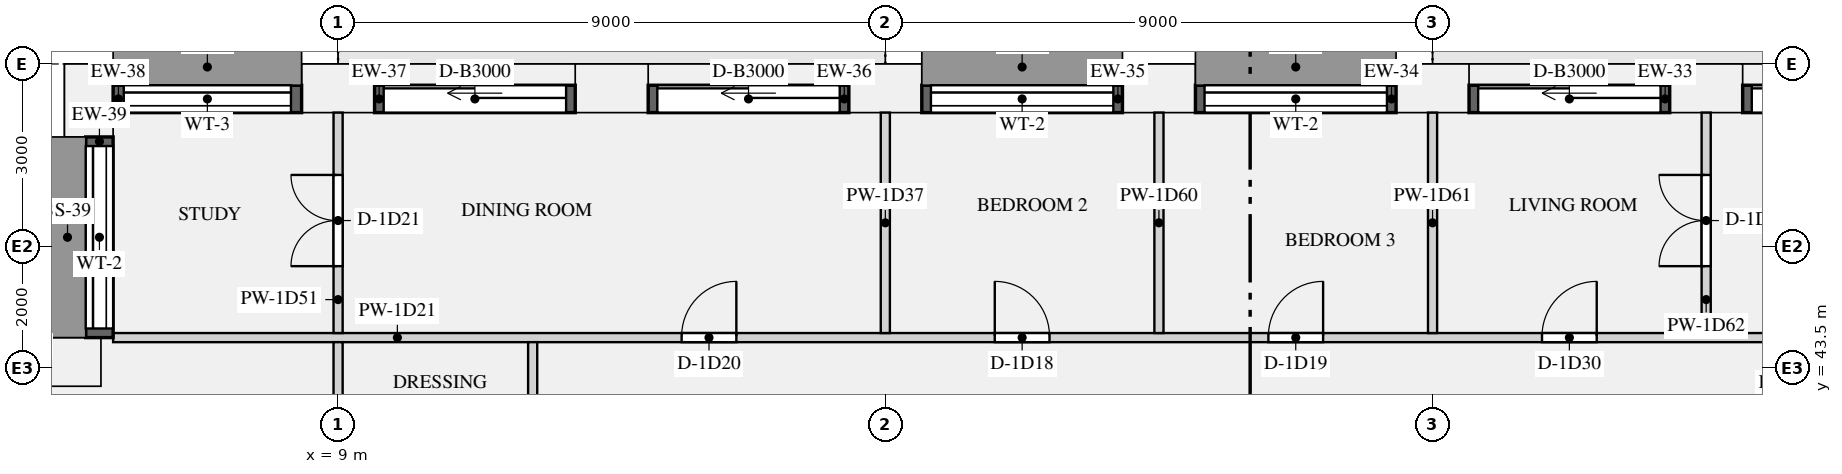
"""IFC4 building model, lengths in metres.
Left out: names, types, materials, properties, quantities, classifications, styles, units other than length and angle.
Written with IfcOpenShell. Run it as: python <this file> out.ifc"""

import sys

from ifc_helpers import new_model, si_unit, direction, frame, frame_2d, origin, origin_2d, place, context, subcontext, project, spatial, rectangle, extrude, element, fill, save


model = new_model("IFC4")
c1 = context("Model", 3, precision=1e-05, world=origin(), true_north=direction((0.0, 1.0)))
c2 = subcontext(c1, "Body", "Model", "MODEL_VIEW")
j1 = project(units=[si_unit("LENGTHUNIT", "METRE"), si_unit("PLANEANGLEUNIT", "RADIAN")], contexts=[c1])
p1 = place(None, origin())
s1 = spatial("IfcSite", under=j1, at=p1, CompositionType="ELEMENT")
p2 = place(p1, origin())
s2 = spatial("IfcBuilding", under=s1, at=p2, CompositionType="ELEMENT")
p3 = place(p2, frame((0.0, 0.0, 47.85)))
s3 = spatial("IfcBuildingStorey", under=s2, at=p3, CompositionType="ELEMENT", Elevation=47.85)
for number, where, z_axis, x_axis in (
    (1, (31.5, 48.1, 0.0), (0.0, 0.0, 1.0), (-1.0, 0.0, 0.0)),
    (2, (27.0, 48.1, 0.0), (0.0, 0.0, 1.0), (-1.0, 0.0, 0.0)),
    (3, (22.5, 48.1, 0.0), (0.0, 0.0, 1.0), (-1.0, 0.0, 0.0)),
    (4, (18.0, 48.1, 0.0), (0.0, 0.0, 1.0), (-1.0, 0.0, 0.0)),
    (5, (13.5, 48.1, 0.0), (0.0, 0.0, 1.0), (-1.0, 0.0, 0.0)),
    (6, (9.0, 48.1, 0.0), (0.0, 0.0, 1.0), (-1.0, 0.0, 0.0)),
    (7, (4.9, 47.9, 0.0), (0.0, 0.0, 1.0), (0.0, -1.0, 0.0)),
    (8, (4.5, 43.6, 0.0), (0.0, 0.0, 1.0), (-1.0, 0.0, 0.0)),
):
    element("IfcColumn", number, at=place(p3, frame(where, z_axis=z_axis, x_axis=x_axis)), inside=s3, PredefinedType="USERDEFINED", context=c2, shape_type="SweptSolid", body=[
        extrude(rectangle(XDim=1.2, YDim=0.8, at=origin_2d()), origin(), (0.0, 0.0, 1.0), 3.15),
    ])
p4 = place(p3, frame((35.4, 47.925, 0.0), z_axis=(0.0, 0.0, 1.0), x_axis=(-1.0, 0.0, 0.0)))
e9 = element("IfcWall", 9, at=p4, inside=s3, PredefinedType="SOLIDWALL", context=c2, shape_type="SweptSolid", body=[
    extrude(rectangle(XDim=3.3, YDim=0.45, at=frame_2d((1.65, 0.0))), origin(), (0.0, 0.0, 1.0), 2.83),
])
p5 = place(p4, frame((0.15, 0.0, 0.0)))
e10 = element("IfcOpeningElement", 10, at=p5, cuts=e9, PredefinedType="OPENING", context=c2, shape_type="SweptSolid", body=[
    extrude(rectangle(XDim=3.0, YDim=2.3, at=frame_2d((1.5, 1.15))), frame((0.0, 0.235, 0.0), z_axis=(0.0, -1.0, 0.0), x_axis=(1.0, 0.0, 0.0)), (0.0, 0.0, 1.0), 0.47),
])
p6 = place(p3, frame((30.9, 47.925, 0.0), z_axis=(0.0, 0.0, 1.0), x_axis=(-1.0, 0.0, 0.0)))
e11 = element("IfcWall", 11, at=p6, inside=s3, PredefinedType="SOLIDWALL", context=c2, shape_type="SweptSolid", body=[
    extrude(rectangle(XDim=3.3, YDim=0.45, at=frame_2d((1.65, 0.0))), origin(), (0.0, 0.0, 1.0), 2.83),
])
p7 = place(p6, frame((0.15, 0.0, 0.0)))
e12 = element("IfcOpeningElement", 12, at=p7, cuts=e11, PredefinedType="OPENING", context=c2, shape_type="SweptSolid", body=[
    extrude(rectangle(XDim=3.0, YDim=2.3, at=frame_2d((1.5, 1.15))), frame((0.0, 0.235, 0.0), z_axis=(0.0, -1.0, 0.0), x_axis=(1.0, 0.0, 0.0)), (0.0, 0.0, 1.0), 0.47),
])
p8 = place(p3, frame((26.4, 47.925, 0.9), z_axis=(0.0, 0.0, 1.0), x_axis=(-1.0, 0.0, 0.0)))
e13 = element("IfcWall", 13, at=p8, inside=s3, PredefinedType="SOLIDWALL", context=c2, shape_type="SweptSolid", body=[
    extrude(rectangle(XDim=3.3, YDim=0.45, at=frame_2d((1.65, 0.0))), origin(), (0.0, 0.0, 1.0), 1.93),
])
p9 = place(p8, frame((0.15, 0.0, 0.15)))
e14 = element("IfcOpeningElement", 14, at=p9, cuts=e13, PredefinedType="OPENING", context=c2, shape_type="SweptSolid", body=[
    extrude(rectangle(XDim=3.0, YDim=1.5, at=frame_2d((1.5, 0.75))), frame((0.0, 0.235, 0.0), z_axis=(0.0, -1.0, 0.0), x_axis=(1.0, 0.0, 0.0)), (0.0, 0.0, 1.0), 0.47),
])
p10 = place(p3, frame((21.9, 47.925, 0.9), z_axis=(0.0, 0.0, 1.0), x_axis=(-1.0, 0.0, 0.0)))
e15 = element("IfcWall", 15, at=p10, inside=s3, PredefinedType="SOLIDWALL", context=c2, shape_type="SweptSolid", body=[
    extrude(rectangle(XDim=3.3, YDim=0.45, at=frame_2d((1.65, 0.0))), origin(), (0.0, 0.0, 1.0), 1.93),
])
p11 = place(p10, frame((0.15, 0.0, 0.15)))
e16 = element("IfcOpeningElement", 16, at=p11, cuts=e15, PredefinedType="OPENING", context=c2, shape_type="SweptSolid", body=[
    extrude(rectangle(XDim=3.0, YDim=1.5, at=frame_2d((1.5, 0.75))), frame((0.0, 0.235, 0.0), z_axis=(0.0, -1.0, 0.0), x_axis=(1.0, 0.0, 0.0)), (0.0, 0.0, 1.0), 0.47),
])
p12 = place(p3, frame((17.4, 47.925, 0.0), z_axis=(0.0, 0.0, 1.0), x_axis=(-1.0, 0.0, 0.0)))
e17 = element("IfcWall", 17, at=p12, inside=s3, PredefinedType="SOLIDWALL", context=c2, shape_type="SweptSolid", body=[
    extrude(rectangle(XDim=3.3, YDim=0.45, at=frame_2d((1.65, 0.0))), origin(), (0.0, 0.0, 1.0), 2.83),
])
p13 = place(p12, frame((0.15, 0.0, 0.0)))
e18 = element("IfcOpeningElement", 18, at=p13, cuts=e17, PredefinedType="OPENING", context=c2, shape_type="SweptSolid", body=[
    extrude(rectangle(XDim=3.0, YDim=2.3, at=frame_2d((1.5, 1.15))), frame((0.0, 0.235, 0.0), z_axis=(0.0, -1.0, 0.0), x_axis=(1.0, 0.0, 0.0)), (0.0, 0.0, 1.0), 0.47),
])
p14 = place(p3, frame((12.9, 47.925, 0.0), z_axis=(0.0, 0.0, 1.0), x_axis=(-1.0, 0.0, 0.0)))
e19 = element("IfcWall", 19, at=p14, inside=s3, PredefinedType="SOLIDWALL", context=c2, shape_type="SweptSolid", body=[
    extrude(rectangle(XDim=3.3, YDim=0.45, at=frame_2d((1.65, 0.0))), origin(), (0.0, 0.0, 1.0), 2.83),
])
p15 = place(p14, frame((0.15, 0.0, 0.0)))
e20 = element("IfcOpeningElement", 20, at=p15, cuts=e19, PredefinedType="OPENING", context=c2, shape_type="SweptSolid", body=[
    extrude(rectangle(XDim=3.0, YDim=2.3, at=frame_2d((1.5, 1.15))), frame((0.0, 0.235, 0.0), z_axis=(0.0, -1.0, 0.0), x_axis=(1.0, 0.0, 0.0)), (0.0, 0.0, 1.0), 0.47),
])
p16 = place(p3, frame((8.4, 47.925, 0.9), z_axis=(0.0, 0.0, 1.0), x_axis=(-1.0, 0.0, 0.0)))
e21 = element("IfcWall", 21, at=p16, inside=s3, PredefinedType="SOLIDWALL", context=c2, shape_type="SweptSolid", body=[
    extrude(rectangle(XDim=3.1, YDim=0.45, at=frame_2d((1.55, 0.0))), origin(), (0.0, 0.0, 1.0), 1.93),
])
p17 = place(p16, frame((0.175, 0.0, 0.15)))
e22 = element("IfcOpeningElement", 22, at=p17, cuts=e21, PredefinedType="OPENING", context=c2, shape_type="SweptSolid", body=[
    extrude(rectangle(XDim=2.75, YDim=1.5, at=frame_2d((1.375, 0.75))), frame((0.0, 0.235, 0.0), z_axis=(0.0, -1.0, 0.0), x_axis=(1.0, 0.0, 0.0)), (0.0, 0.0, 1.0), 0.47),
])
p18 = place(p3, frame((5.075, 47.3, 0.9), z_axis=(0.0, 0.0, 1.0), x_axis=(0.0, -1.0, 0.0)))
e23 = element("IfcWall", 23, at=p18, inside=s3, PredefinedType="SOLIDWALL", context=c2, shape_type="SweptSolid", body=[
    extrude(rectangle(XDim=3.3, YDim=0.45, at=frame_2d((1.65, 0.0))), origin(), (0.0, 0.0, 1.0), 1.93),
])
p19 = place(p18, frame((0.15, 0.0, 0.15)))
e24 = element("IfcOpeningElement", 24, at=p19, cuts=e23, PredefinedType="OPENING", context=c2, shape_type="SweptSolid", body=[
    extrude(rectangle(XDim=3.0, YDim=1.5, at=frame_2d((1.5, 0.75))), frame((0.0, 0.235, 0.0), z_axis=(0.0, -1.0, 0.0), x_axis=(1.0, 0.0, 0.0)), (0.0, 0.0, 1.0), 0.47),
])
p20 = place(p3, frame((5.3, 44.0, 0.0), z_axis=(0.0, 0.0, 1.0), x_axis=(1.0, 0.0, 0.0)))
e25 = element("IfcWall", 25, at=p20, inside=s3, PredefinedType="PARTITIONING", context=c2, shape_type="SweptSolid", body=[
    extrude(rectangle(XDim=27.775, YDim=0.15, at=frame_2d((13.887, 0.0))), origin(), (0.0, 0.0, 1.0), 2.83),
])
p21 = place(p20, frame((14.5, 0.0, 0.0)))
e26 = element("IfcOpeningElement", 26, at=p21, cuts=e25, PredefinedType="OPENING", context=c2, shape_type="SweptSolid", body=[
    extrude(rectangle(XDim=0.9, YDim=2.1, at=frame_2d((0.45, 1.05))), frame((0.0, 0.085, 0.0), z_axis=(0.0, -1.0, 0.0), x_axis=(1.0, 0.0, 0.0)), (0.0, 0.0, 1.0), 0.17),
])
p22 = place(p20, frame((19.0, 0.0, 0.0)))
e27 = element("IfcOpeningElement", 27, at=p22, cuts=e25, PredefinedType="OPENING", context=c2, shape_type="SweptSolid", body=[
    extrude(rectangle(XDim=0.9, YDim=2.1, at=frame_2d((0.45, 1.05))), frame((0.0, 0.085, 0.0), z_axis=(0.0, -1.0, 0.0), x_axis=(1.0, 0.0, 0.0)), (0.0, 0.0, 1.0), 0.17),
])
p23 = place(p20, frame((9.35, 0.0, 0.0)))
e28 = element("IfcOpeningElement", 28, at=p23, cuts=e25, PredefinedType="OPENING", context=c2, shape_type="SweptSolid", body=[
    extrude(rectangle(XDim=0.9, YDim=2.1, at=frame_2d((0.45, 1.05))), frame((0.0, 0.085, 0.0), z_axis=(0.0, -1.0, 0.0), x_axis=(1.0, 0.0, 0.0)), (0.0, 0.0, 1.0), 0.17),
])
p24 = place(p20, frame((23.5, 0.0, 0.0)))
e29 = element("IfcOpeningElement", 29, at=p24, cuts=e25, PredefinedType="OPENING", context=c2, shape_type="SweptSolid", body=[
    extrude(rectangle(XDim=0.9, YDim=2.1, at=frame_2d((0.45, 1.05))), frame((0.0, 0.085, 0.0), z_axis=(0.0, -1.0, 0.0), x_axis=(1.0, 0.0, 0.0)), (0.0, 0.0, 1.0), 0.17),
])
p25 = place(p3, frame((18.0, 44.075, 0.0), z_axis=(0.0, 0.0, 1.0), x_axis=(0.0, 1.0, 0.0)))
e30 = element("IfcWall", 30, at=p25, inside=s3, PredefinedType="PARTITIONING", context=c2, shape_type="SweptSolid", body=[
    extrude(rectangle(XDim=3.625, YDim=0.15, at=frame_2d((1.812, 0.0))), origin(), (0.0, 0.0, 1.0), 2.83),
])
p26 = place(p3, frame((9.0, 36.35, 0.0), z_axis=(0.0, 0.0, 1.0), x_axis=(0.0, 1.0, 0.0)))
e31 = element("IfcWall", 31, at=p26, inside=s3, PredefinedType="PARTITIONING", context=c2, shape_type="SweptSolid", body=[
    extrude(rectangle(XDim=7.575, YDim=0.15, at=frame_2d((3.788, 0.0))), origin(), (0.0, 0.0, 1.0), 2.83),
])
p27 = place(p26, frame((5.312, 0.0, 0.0)))
e32 = element("IfcOpeningElement", 32, at=p27, cuts=e31, PredefinedType="OPENING", context=c2, shape_type="SweptSolid", body=[
    extrude(rectangle(XDim=0.8, YDim=2.1, at=frame_2d((0.4, 1.05))), frame((0.0, 0.085, 0.0), z_axis=(0.0, -1.0, 0.0), x_axis=(1.0, 0.0, 0.0)), (0.0, 0.0, 1.0), 0.17),
])
p28 = place(p26, frame((1.438, 0.0, 0.0)))
e33 = element("IfcOpeningElement", 33, at=p28, cuts=e31, PredefinedType="OPENING", context=c2, shape_type="SweptSolid", body=[
    extrude(rectangle(XDim=0.8, YDim=2.1, at=frame_2d((0.4, 1.05))), frame((0.0, 0.085, 0.0), z_axis=(0.0, -1.0, 0.0), x_axis=(1.0, 0.0, 0.0)), (0.0, 0.0, 1.0), 0.17),
])
p29 = place(p3, frame((9.0, 44.075, 0.0), z_axis=(0.0, 0.0, 1.0), x_axis=(0.0, 1.0, 0.0)))
e34 = element("IfcWall", 34, at=p29, inside=s3, PredefinedType="PARTITIONING", context=c2, shape_type="SweptSolid", body=[
    extrude(rectangle(XDim=3.625, YDim=0.15, at=frame_2d((1.812, 0.0))), origin(), (0.0, 0.0, 1.0), 2.83),
])
p30 = place(p29, frame((1.1, 0.0, 0.0)))
e35 = element("IfcOpeningElement", 35, at=p30, cuts=e34, PredefinedType="OPENING", context=c2, shape_type="SweptSolid", body=[
    extrude(rectangle(XDim=1.5, YDim=2.1, at=frame_2d((0.75, 1.05))), frame((0.0, 0.085, 0.0), z_axis=(0.0, -1.0, 0.0), x_axis=(1.0, 0.0, 0.0)), (0.0, 0.0, 1.0), 0.17),
])
p31 = place(p3, frame((12.2, 36.35, 0.0), z_axis=(0.0, 0.0, 1.0), x_axis=(0.0, 1.0, 0.0)))
e36 = element("IfcWall", 36, at=p31, inside=s3, PredefinedType="PARTITIONING", context=c2, shape_type="SweptSolid", body=[
    extrude(rectangle(XDim=7.575, YDim=0.15, at=frame_2d((3.788, 0.0))), origin(), (0.0, 0.0, 1.0), 2.83),
])
p32 = place(p31, frame((5.312, 0.0, 0.0)))
e37 = element("IfcOpeningElement", 37, at=p32, cuts=e36, PredefinedType="OPENING", context=c2, shape_type="SweptSolid", body=[
    extrude(rectangle(XDim=0.8, YDim=2.1, at=frame_2d((0.4, 1.05))), frame((0.0, 0.085, 0.0), z_axis=(0.0, -1.0, 0.0), x_axis=(1.0, 0.0, 0.0)), (0.0, 0.0, 1.0), 0.17),
])
for number, where, z_axis, x_axis in (
    (38, (22.5, 44.075, 0.0), (0.0, 0.0, 1.0), (0.0, 1.0, 0.0)),
    (39, (27.0, 44.075, 0.0), (0.0, 0.0, 1.0), (0.0, 1.0, 0.0)),
):
    element("IfcWall", number, at=place(p3, frame(where, z_axis=z_axis, x_axis=x_axis)), inside=s3, PredefinedType="PARTITIONING", context=c2, shape_type="SweptSolid", body=[
        extrude(rectangle(XDim=3.625, YDim=0.15, at=frame_2d((1.812, 0.0))), origin(), (0.0, 0.0, 1.0), 2.83),
    ])
p33 = place(p3, frame((31.5, 44.075, 0.0), z_axis=(0.0, 0.0, 1.0), x_axis=(0.0, 1.0, 0.0)))
e40 = element("IfcWall", 40, at=p33, inside=s3, PredefinedType="PARTITIONING", context=c2, shape_type="SweptSolid", body=[
    extrude(rectangle(XDim=3.625, YDim=0.15, at=frame_2d((1.812, 0.0))), origin(), (0.0, 0.0, 1.0), 2.83),
])
p34 = place(p33, frame((1.1, 0.0, 0.0)))
e41 = element("IfcOpeningElement", 41, at=p34, cuts=e40, PredefinedType="OPENING", context=c2, shape_type="SweptSolid", body=[
    extrude(rectangle(XDim=1.5, YDim=2.1, at=frame_2d((0.75, 1.05))), frame((0.0, 0.085, 0.0), z_axis=(0.0, -1.0, 0.0), x_axis=(1.0, 0.0, 0.0)), (0.0, 0.0, 1.0), 0.17),
])
p35 = place(p5, origin())
e42 = element("IfcDoor", 42, at=p35, inside=s3, OperationType="SLIDING_TO_LEFT", PredefinedType="DOOR", context=c2, shape_type="SweptSolid", body=[
    extrude(rectangle(XDim=3.0, YDim=2.3, at=frame_2d((1.5, 1.15))), frame((0.0, -0.07, 0.0), z_axis=(0.0, -1.0, 0.0), x_axis=(1.0, 0.0, 0.0)), (0.0, 0.0, 1.0), 0.05),
])
fill(e10, e42)
p36 = place(p7, origin())
e43 = element("IfcDoor", 43, at=p36, inside=s3, OperationType="SLIDING_TO_LEFT", PredefinedType="DOOR", context=c2, shape_type="SweptSolid", body=[
    extrude(rectangle(XDim=3.0, YDim=2.3, at=frame_2d((1.5, 1.15))), frame((0.0, -0.07, 0.0), z_axis=(0.0, -1.0, 0.0), x_axis=(1.0, 0.0, 0.0)), (0.0, 0.0, 1.0), 0.05),
])
fill(e12, e43)
p37 = place(p9, origin())
e44 = element("IfcWindow", 44, at=p37, inside=s3, PartitioningType="SINGLE_PANEL", PredefinedType="WINDOW", context=c2, shape_type="SweptSolid", body=[
    extrude(rectangle(XDim=3.0, YDim=1.5, at=frame_2d((1.5, 0.75))), frame((0.0, -0.065, 0.0), z_axis=(0.0, -1.0, 0.0), x_axis=(1.0, 0.0, 0.0)), (0.0, 0.0, 1.0), 0.06),
])
fill(e14, e44)
p38 = place(p11, origin())
e45 = element("IfcWindow", 45, at=p38, inside=s3, PartitioningType="SINGLE_PANEL", PredefinedType="WINDOW", context=c2, shape_type="SweptSolid", body=[
    extrude(rectangle(XDim=3.0, YDim=1.5, at=frame_2d((1.5, 0.75))), frame((0.0, -0.065, 0.0), z_axis=(0.0, -1.0, 0.0), x_axis=(1.0, 0.0, 0.0)), (0.0, 0.0, 1.0), 0.06),
])
fill(e16, e45)
p39 = place(p13, origin())
e46 = element("IfcDoor", 46, at=p39, inside=s3, OperationType="SLIDING_TO_LEFT", PredefinedType="DOOR", context=c2, shape_type="SweptSolid", body=[
    extrude(rectangle(XDim=3.0, YDim=2.3, at=frame_2d((1.5, 1.15))), frame((0.0, -0.07, 0.0), z_axis=(0.0, -1.0, 0.0), x_axis=(1.0, 0.0, 0.0)), (0.0, 0.0, 1.0), 0.05),
])
fill(e18, e46)
p40 = place(p15, origin())
e47 = element("IfcDoor", 47, at=p40, inside=s3, OperationType="SLIDING_TO_LEFT", PredefinedType="DOOR", context=c2, shape_type="SweptSolid", body=[
    extrude(rectangle(XDim=3.0, YDim=2.3, at=frame_2d((1.5, 1.15))), frame((0.0, -0.07, 0.0), z_axis=(0.0, -1.0, 0.0), x_axis=(1.0, 0.0, 0.0)), (0.0, 0.0, 1.0), 0.05),
])
fill(e20, e47)
p41 = place(p17, origin())
e48 = element("IfcWindow", 48, at=p41, inside=s3, PartitioningType="SINGLE_PANEL", PredefinedType="WINDOW", context=c2, shape_type="SweptSolid", body=[
    extrude(rectangle(XDim=2.75, YDim=1.5, at=frame_2d((1.375, 0.75))), frame((0.0, -0.065, 0.0), z_axis=(0.0, -1.0, 0.0), x_axis=(1.0, 0.0, 0.0)), (0.0, 0.0, 1.0), 0.06),
])
fill(e22, e48)
p42 = place(p19, origin())
e49 = element("IfcWindow", 49, at=p42, inside=s3, PartitioningType="SINGLE_PANEL", PredefinedType="WINDOW", context=c2, shape_type="SweptSolid", body=[
    extrude(rectangle(XDim=3.0, YDim=1.5, at=frame_2d((1.5, 0.75))), frame((0.0, -0.065, 0.0), z_axis=(0.0, -1.0, 0.0), x_axis=(1.0, 0.0, 0.0)), (0.0, 0.0, 1.0), 0.06),
])
fill(e24, e49)
p43 = place(p21, origin())
e50 = element("IfcDoor", 50, at=p43, inside=s3, OperationType="SINGLE_SWING_LEFT", PredefinedType="DOOR", context=c2, shape_type="SweptSolid", body=[
    extrude(rectangle(XDim=0.9, YDim=2.1, at=frame_2d((0.45, 1.05))), frame((0.0, 0.025, 0.0), z_axis=(0.0, -1.0, 0.0), x_axis=(1.0, 0.0, 0.0)), (0.0, 0.0, 1.0), 0.05),
])
fill(e26, e50)
p44 = place(p22, origin())
e51 = element("IfcDoor", 51, at=p44, inside=s3, OperationType="SINGLE_SWING_RIGHT", PredefinedType="DOOR", context=c2, shape_type="SweptSolid", body=[
    extrude(rectangle(XDim=0.9, YDim=2.1, at=frame_2d((0.45, 1.05))), frame((0.0, 0.025, 0.0), z_axis=(0.0, -1.0, 0.0), x_axis=(1.0, 0.0, 0.0)), (0.0, 0.0, 1.0), 0.05),
])
fill(e27, e51)
p45 = place(p23, origin())
e52 = element("IfcDoor", 52, at=p45, inside=s3, OperationType="SINGLE_SWING_RIGHT", PredefinedType="DOOR", context=c2, shape_type="SweptSolid", body=[
    extrude(rectangle(XDim=0.9, YDim=2.1, at=frame_2d((0.45, 1.05))), frame((0.0, 0.025, 0.0), z_axis=(0.0, -1.0, 0.0), x_axis=(1.0, 0.0, 0.0)), (0.0, 0.0, 1.0), 0.05),
])
fill(e28, e52)
p46 = place(p30, origin())
e53 = element("IfcDoor", 53, at=p46, inside=s3, OperationType="DOUBLE_DOOR_SINGLE_SWING", PredefinedType="DOOR", context=c2, shape_type="SweptSolid", body=[
    extrude(rectangle(XDim=1.5, YDim=2.1, at=frame_2d((0.75, 1.05))), frame((0.0, 0.025, 0.0), z_axis=(0.0, -1.0, 0.0), x_axis=(1.0, 0.0, 0.0)), (0.0, 0.0, 1.0), 0.05),
])
fill(e35, e53)
p47 = place(p34, origin())
e54 = element("IfcDoor", 54, at=p47, inside=s3, OperationType="DOUBLE_DOOR_SINGLE_SWING", PredefinedType="DOOR", context=c2, shape_type="SweptSolid", body=[
    extrude(rectangle(XDim=1.5, YDim=2.1, at=frame_2d((0.75, 1.05))), frame((0.0, 0.025, 0.0), z_axis=(0.0, -1.0, 0.0), x_axis=(1.0, 0.0, 0.0)), (0.0, 0.0, 1.0), 0.05),
])
fill(e41, e54)
p48 = place(p24, origin())
e55 = element("IfcDoor", 55, at=p48, inside=s3, OperationType="SINGLE_SWING_RIGHT", PredefinedType="DOOR", context=c2, shape_type="SweptSolid", body=[
    extrude(rectangle(XDim=0.9, YDim=2.1, at=frame_2d((0.45, 1.05))), frame((0.0, 0.025, 0.0), z_axis=(0.0, -1.0, 0.0), x_axis=(1.0, 0.0, 0.0)), (0.0, 0.0, 1.0), 0.05),
])
fill(e29, e55)
save(model, sys.argv[1])
